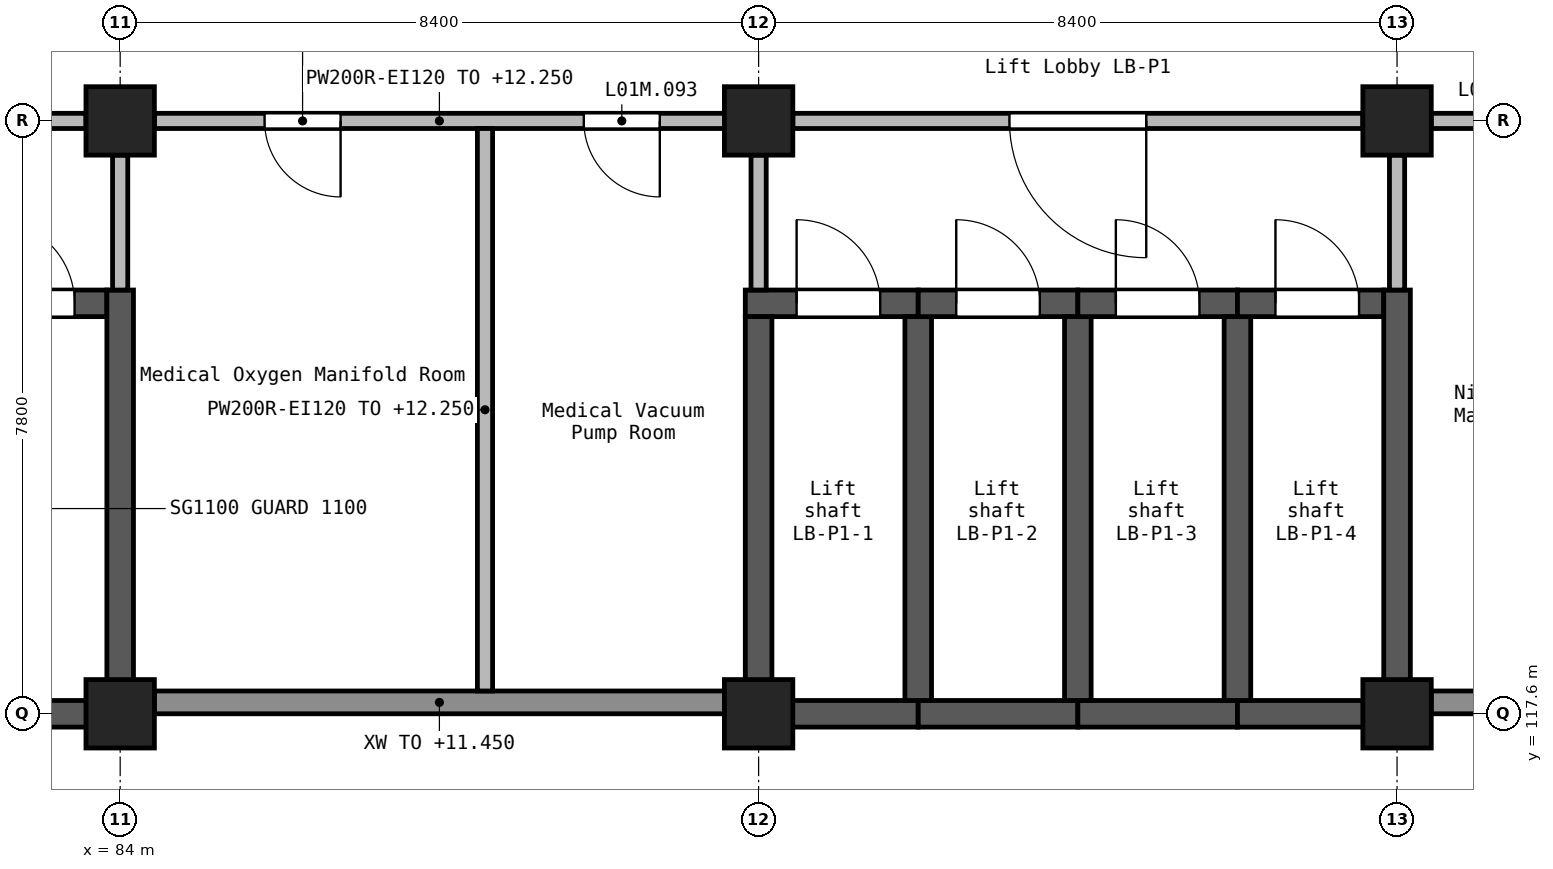
"""IFC4 building model, lengths in metres.
Left out: names, types, materials, properties, quantities, classifications, styles, units other than length and angle.
Written with IfcOpenShell. Run it as: python <this file> out.ifc"""

import sys

from ifc_helpers import new_model, si_unit, direction, frame, frame_2d, origin, origin_2d, place, context, subcontext, project, spatial, rectangle, extrude, element, fill, save


model = new_model("IFC4")
c1 = context("Model", 3, precision=1e-05, world=origin(), true_north=direction((0.0, 1.0)))
c2 = subcontext(c1, "Body", "Model", "MODEL_VIEW")
j1 = project(units=[si_unit("LENGTHUNIT", "METRE"), si_unit("PLANEANGLEUNIT", "RADIAN")], contexts=[c1])
p1 = place(None, origin())
s1 = spatial("IfcSite", under=j1, at=p1, CompositionType="ELEMENT")
p2 = place(p1, origin())
s2 = spatial("IfcBuilding", under=s1, at=p2, CompositionType="ELEMENT")
p3 = place(p2, frame((0.0, 0.0, 9.9)))
s3 = spatial("IfcBuildingStorey", under=s2, at=p3, CompositionType="ELEMENT", Elevation=9.9)
for number, where, z_axis, x_axis in (
    (1, (84.0, 117.6, 0.0), (0.0, 0.0, 1.0), (1.0, 0.0, 0.0)),
    (2, (84.0, 125.4, 0.0), (0.0, 0.0, 1.0), (1.0, 0.0, 0.0)),
    (3, (92.4, 117.6, 0.0), (0.0, 0.0, 1.0), (1.0, 0.0, 0.0)),
    (4, (92.4, 125.4, 0.0), (0.0, 0.0, 1.0), (1.0, 0.0, 0.0)),
    (5, (100.8, 117.6, 0.0), (0.0, 0.0, 1.0), (1.0, 0.0, 0.0)),
    (6, (100.8, 125.4, 0.0), (0.0, 0.0, 1.0), (1.0, 0.0, 0.0)),
):
    element("IfcColumn", number, at=place(p3, frame(where, z_axis=z_axis, x_axis=x_axis)), inside=s3, PredefinedType="COLUMN", context=c2, shape_type="SweptSolid", body=[
        extrude(rectangle(XDim=0.9, YDim=0.9, at=origin_2d()), origin(), (0.0, 0.0, 1.0), 2.7),
    ])
p4 = place(p3, frame((75.425, 123.0, 0.0), z_axis=(0.0, 0.0, 1.0), x_axis=(1.0, 0.0, 0.0)))
e7 = element("IfcWall", 7, at=p4, inside=s3, PredefinedType="SHEAR", context=c2, shape_type="SweptSolid", body=[
    extrude(rectangle(XDim=8.4, YDim=0.35, at=frame_2d((4.2, 0.0))), origin(), (0.0, 0.0, 1.0), 2.7),
])
p5 = place(p4, frame((6.875, 0.0, 0.0)))
e8 = element("IfcOpeningElement", 8, at=p5, cuts=e7, PredefinedType="OPENING", context=c2, shape_type="SweptSolid", body=[
    extrude(rectangle(XDim=1.1, YDim=2.1, at=frame_2d((0.55, 1.05))), frame((0.0, 0.185, 0.0), z_axis=(0.0, -1.0, 0.0), x_axis=(1.0, 0.0, 0.0)), (0.0, 0.0, 1.0), 0.37),
])
p6 = place(p3, frame((75.775, 117.6, 0.0), z_axis=(0.0, 0.0, 1.0), x_axis=(1.0, 0.0, 0.0)))
e9 = element("IfcWall", 9, at=p6, inside=s3, PredefinedType="SHEAR", context=c2, shape_type="SweptSolid", body=[
    extrude(rectangle(XDim=8.05, YDim=0.35, at=frame_2d((4.025, 0.0))), origin(), (0.0, 0.0, 1.0), 2.7),
])
p7 = place(p3, frame((84.0, 117.425, 0.0), z_axis=(0.0, 0.0, 1.0), x_axis=(0.0, 1.0, 0.0)))
e10 = element("IfcWall", 10, at=p7, inside=s3, PredefinedType="SHEAR", context=c2, shape_type="SweptSolid", body=[
    extrude(rectangle(XDim=5.75, YDim=0.35, at=frame_2d((2.875, 0.0))), origin(), (0.0, 0.0, 1.0), 2.7),
])
p8 = place(p3, frame((92.225, 123.0, 0.0), z_axis=(0.0, 0.0, 1.0), x_axis=(1.0, 0.0, 0.0)))
e11 = element("IfcWall", 11, at=p8, inside=s3, PredefinedType="SHEAR", context=c2, shape_type="SweptSolid", body=[
    extrude(rectangle(XDim=2.275, YDim=0.35, at=frame_2d((1.137, 0.0))), origin(), (0.0, 0.0, 1.0), 2.7),
])
p9 = place(p8, frame((0.675, 0.0, 0.0)))
e12 = element("IfcOpeningElement", 12, at=p9, cuts=e11, PredefinedType="OPENING", context=c2, shape_type="SweptSolid", body=[
    extrude(rectangle(XDim=1.1, YDim=2.1, at=frame_2d((0.55, 1.05))), frame((0.0, 0.185, 0.0), z_axis=(0.0, -1.0, 0.0), x_axis=(1.0, 0.0, 0.0)), (0.0, 0.0, 1.0), 0.37),
])
p10 = place(p3, frame((92.4, 117.425, 0.0), z_axis=(0.0, 0.0, 1.0), x_axis=(0.0, 1.0, 0.0)))
e13 = element("IfcWall", 13, at=p10, inside=s3, PredefinedType="SHEAR", context=c2, shape_type="SweptSolid", body=[
    extrude(rectangle(XDim=5.4, YDim=0.35, at=frame_2d((2.7, 0.0))), origin(), (0.0, 0.0, 1.0), 2.7),
])
p11 = place(p3, frame((92.575, 117.6, 0.0), z_axis=(0.0, 0.0, 1.0), x_axis=(1.0, 0.0, 0.0)))
e14 = element("IfcWall", 14, at=p11, inside=s3, PredefinedType="SHEAR", context=c2, shape_type="SweptSolid", body=[
    extrude(rectangle(XDim=1.925, YDim=0.35, at=frame_2d((0.962, 0.0))), origin(), (0.0, 0.0, 1.0), 2.7),
])
p12 = place(p3, frame((94.5, 117.6, 0.0), z_axis=(0.0, 0.0, 1.0), x_axis=(1.0, 0.0, 0.0)))
e15 = element("IfcWall", 15, at=p12, inside=s3, PredefinedType="SHEAR", context=c2, shape_type="SweptSolid", body=[
    extrude(rectangle(XDim=2.1, YDim=0.35, at=frame_2d((1.05, 0.0))), origin(), (0.0, 0.0, 1.0), 2.7),
])
p13 = place(p3, frame((94.5, 117.775, 0.0), z_axis=(0.0, 0.0, 1.0), x_axis=(0.0, 1.0, 0.0)))
e16 = element("IfcWall", 16, at=p13, inside=s3, PredefinedType="SHEAR", context=c2, shape_type="SweptSolid", body=[
    extrude(rectangle(XDim=5.05, YDim=0.35, at=frame_2d((2.525, 0.0))), origin(), (0.0, 0.0, 1.0), 2.7),
])
p14 = place(p3, frame((94.5, 123.0, 0.0), z_axis=(0.0, 0.0, 1.0), x_axis=(1.0, 0.0, 0.0)))
e17 = element("IfcWall", 17, at=p14, inside=s3, PredefinedType="SHEAR", context=c2, shape_type="SweptSolid", body=[
    extrude(rectangle(XDim=2.1, YDim=0.35, at=frame_2d((1.05, 0.0))), origin(), (0.0, 0.0, 1.0), 2.7),
])
p15 = place(p14, frame((0.5, 0.0, 0.0)))
e18 = element("IfcOpeningElement", 18, at=p15, cuts=e17, PredefinedType="OPENING", context=c2, shape_type="SweptSolid", body=[
    extrude(rectangle(XDim=1.1, YDim=2.1, at=frame_2d((0.55, 1.05))), frame((0.0, 0.185, 0.0), z_axis=(0.0, -1.0, 0.0), x_axis=(1.0, 0.0, 0.0)), (0.0, 0.0, 1.0), 0.37),
])
p16 = place(p3, frame((96.6, 117.6, 0.0), z_axis=(0.0, 0.0, 1.0), x_axis=(1.0, 0.0, 0.0)))
e19 = element("IfcWall", 19, at=p16, inside=s3, PredefinedType="SHEAR", context=c2, shape_type="SweptSolid", body=[
    extrude(rectangle(XDim=2.1, YDim=0.35, at=frame_2d((1.05, 0.0))), origin(), (0.0, 0.0, 1.0), 2.7),
])
p17 = place(p3, frame((96.6, 117.775, 0.0), z_axis=(0.0, 0.0, 1.0), x_axis=(0.0, 1.0, 0.0)))
e20 = element("IfcWall", 20, at=p17, inside=s3, PredefinedType="SHEAR", context=c2, shape_type="SweptSolid", body=[
    extrude(rectangle(XDim=5.05, YDim=0.35, at=frame_2d((2.525, 0.0))), origin(), (0.0, 0.0, 1.0), 2.7),
])
p18 = place(p3, frame((96.6, 123.0, 0.0), z_axis=(0.0, 0.0, 1.0), x_axis=(1.0, 0.0, 0.0)))
e21 = element("IfcWall", 21, at=p18, inside=s3, PredefinedType="SHEAR", context=c2, shape_type="SweptSolid", body=[
    extrude(rectangle(XDim=2.1, YDim=0.35, at=frame_2d((1.05, 0.0))), origin(), (0.0, 0.0, 1.0), 2.7),
])
p19 = place(p18, frame((0.5, 0.0, 0.0)))
e22 = element("IfcOpeningElement", 22, at=p19, cuts=e21, PredefinedType="OPENING", context=c2, shape_type="SweptSolid", body=[
    extrude(rectangle(XDim=1.1, YDim=2.1, at=frame_2d((0.55, 1.05))), frame((0.0, 0.185, 0.0), z_axis=(0.0, -1.0, 0.0), x_axis=(1.0, 0.0, 0.0)), (0.0, 0.0, 1.0), 0.37),
])
p20 = place(p3, frame((98.7, 117.6, 0.0), z_axis=(0.0, 0.0, 1.0), x_axis=(1.0, 0.0, 0.0)))
e23 = element("IfcWall", 23, at=p20, inside=s3, PredefinedType="SHEAR", context=c2, shape_type="SweptSolid", body=[
    extrude(rectangle(XDim=1.925, YDim=0.35, at=frame_2d((0.962, 0.0))), origin(), (0.0, 0.0, 1.0), 2.7),
])
p21 = place(p3, frame((98.7, 117.775, 0.0), z_axis=(0.0, 0.0, 1.0), x_axis=(0.0, 1.0, 0.0)))
e24 = element("IfcWall", 24, at=p21, inside=s3, PredefinedType="SHEAR", context=c2, shape_type="SweptSolid", body=[
    extrude(rectangle(XDim=5.05, YDim=0.35, at=frame_2d((2.525, 0.0))), origin(), (0.0, 0.0, 1.0), 2.7),
])
p22 = place(p3, frame((98.7, 123.0, 0.0), z_axis=(0.0, 0.0, 1.0), x_axis=(1.0, 0.0, 0.0)))
e25 = element("IfcWall", 25, at=p22, inside=s3, PredefinedType="SHEAR", context=c2, shape_type="SweptSolid", body=[
    extrude(rectangle(XDim=1.925, YDim=0.35, at=frame_2d((0.962, 0.0))), origin(), (0.0, 0.0, 1.0), 2.7),
])
p23 = place(p22, frame((0.5, 0.0, 0.0)))
e26 = element("IfcOpeningElement", 26, at=p23, cuts=e25, PredefinedType="OPENING", context=c2, shape_type="SweptSolid", body=[
    extrude(rectangle(XDim=1.1, YDim=2.1, at=frame_2d((0.55, 1.05))), frame((0.0, 0.185, 0.0), z_axis=(0.0, -1.0, 0.0), x_axis=(1.0, 0.0, 0.0)), (0.0, 0.0, 1.0), 0.37),
])
p24 = place(p3, frame((100.8, 117.425, 0.0), z_axis=(0.0, 0.0, 1.0), x_axis=(0.0, 1.0, 0.0)))
e27 = element("IfcWall", 27, at=p24, inside=s3, PredefinedType="SHEAR", context=c2, shape_type="SweptSolid", body=[
    extrude(rectangle(XDim=5.75, YDim=0.35, at=frame_2d((2.875, 0.0))), origin(), (0.0, 0.0, 1.0), 2.7),
])
for number, where, z_axis, x_axis in (
    (28, (84.45, 117.75, 0.0), (0.0, 0.0, 1.0), (1.0, 0.0, 0.0)),
    (29, (101.25, 117.75, 0.0), (0.0, 0.0, 1.0), (1.0, 0.0, 0.0)),
):
    element("IfcWall", number, at=place(p3, frame(where, z_axis=z_axis, x_axis=x_axis)), inside=s3, PredefinedType="STANDARD", context=c2, shape_type="SweptSolid", body=[
        extrude(rectangle(XDim=7.5, YDim=0.3, at=frame_2d((3.75, 0.0))), origin(), (0.0, 0.0, 1.0), 1.55),
    ])
p25 = place(p3, frame((108.75, 125.4, 0.0), z_axis=(0.0, 0.0, 1.0), x_axis=(-1.0, 0.0, 0.0)))
e30 = element("IfcWall", 30, at=p25, inside=s3, PredefinedType="SOLIDWALL", context=c2, shape_type="SweptSolid", body=[
    extrude(rectangle(XDim=7.5, YDim=0.2, at=frame_2d((3.75, 0.0))), origin(), (0.0, 0.0, 1.0), 2.35),
])
p26 = place(p25, frame((5.65, 0.0, 0.0)))
e31 = element("IfcOpeningElement", 31, at=p26, cuts=e30, PredefinedType="OPENING", context=c2, shape_type="SweptSolid", body=[
    extrude(rectangle(XDim=1.0, YDim=2.1, at=frame_2d((0.5, 1.05))), frame((0.0, 0.11, 0.0), z_axis=(0.0, -1.0, 0.0), x_axis=(1.0, 0.0, 0.0)), (0.0, 0.0, 1.0), 0.22),
])
p27 = place(p25, frame((1.45, 0.0, 0.0)))
e32 = element("IfcOpeningElement", 32, at=p27, cuts=e30, PredefinedType="OPENING", context=c2, shape_type="SweptSolid", body=[
    extrude(rectangle(XDim=1.0, YDim=2.1, at=frame_2d((0.5, 1.05))), frame((0.0, 0.11, 0.0), z_axis=(0.0, -1.0, 0.0), x_axis=(1.0, 0.0, 0.0)), (0.0, 0.0, 1.0), 0.22),
])
p28 = place(p3, frame((100.35, 125.4, 0.0), z_axis=(0.0, 0.0, 1.0), x_axis=(-1.0, 0.0, 0.0)))
e33 = element("IfcWall", 33, at=p28, inside=s3, PredefinedType="SOLIDWALL", context=c2, shape_type="SweptSolid", body=[
    extrude(rectangle(XDim=7.5, YDim=0.2, at=frame_2d((3.75, 0.0))), origin(), (0.0, 0.0, 1.0), 2.35),
])
p29 = place(p28, frame((2.85, 0.0, 0.0)))
e34 = element("IfcOpeningElement", 34, at=p29, cuts=e33, PredefinedType="OPENING", context=c2, shape_type="SweptSolid", body=[
    extrude(rectangle(XDim=1.8, YDim=2.1, at=frame_2d((0.9, 1.05))), frame((0.0, 0.11, 0.0), z_axis=(0.0, -1.0, 0.0), x_axis=(1.0, 0.0, 0.0)), (0.0, 0.0, 1.0), 0.22),
])
p30 = place(p3, frame((91.95, 125.4, 0.0), z_axis=(0.0, 0.0, 1.0), x_axis=(-1.0, 0.0, 0.0)))
e35 = element("IfcWall", 35, at=p30, inside=s3, PredefinedType="SOLIDWALL", context=c2, shape_type="SweptSolid", body=[
    extrude(rectangle(XDim=7.5, YDim=0.2, at=frame_2d((3.75, 0.0))), origin(), (0.0, 0.0, 1.0), 2.35),
])
p31 = place(p30, frame((5.05, 0.0, 0.0)))
e36 = element("IfcOpeningElement", 36, at=p31, cuts=e35, PredefinedType="OPENING", context=c2, shape_type="SweptSolid", body=[
    extrude(rectangle(XDim=1.0, YDim=2.1, at=frame_2d((0.5, 1.05))), frame((0.0, 0.11, 0.0), z_axis=(0.0, -1.0, 0.0), x_axis=(1.0, 0.0, 0.0)), (0.0, 0.0, 1.0), 0.22),
])
p32 = place(p30, frame((0.85, 0.0, 0.0)))
e37 = element("IfcOpeningElement", 37, at=p32, cuts=e35, PredefinedType="OPENING", context=c2, shape_type="SweptSolid", body=[
    extrude(rectangle(XDim=1.0, YDim=2.1, at=frame_2d((0.5, 1.05))), frame((0.0, 0.11, 0.0), z_axis=(0.0, -1.0, 0.0), x_axis=(1.0, 0.0, 0.0)), (0.0, 0.0, 1.0), 0.22),
])
p33 = place(p3, frame((83.55, 125.4, 0.0), z_axis=(0.0, 0.0, 1.0), x_axis=(-1.0, 0.0, 0.0)))
e38 = element("IfcWall", 38, at=p33, inside=s3, PredefinedType="SOLIDWALL", context=c2, shape_type="SweptSolid", body=[
    extrude(rectangle(XDim=7.5, YDim=0.2, at=frame_2d((3.75, 0.0))), origin(), (0.0, 0.0, 1.0), 2.35),
])
p34 = place(p33, frame((3.2, 0.0, 0.0)))
e39 = element("IfcOpeningElement", 39, at=p34, cuts=e38, PredefinedType="OPENING", context=c2, shape_type="SweptSolid", body=[
    extrude(rectangle(XDim=1.1, YDim=2.1, at=frame_2d((0.55, 1.05))), frame((0.0, 0.11, 0.0), z_axis=(0.0, -1.0, 0.0), x_axis=(1.0, 0.0, 0.0)), (0.0, 0.0, 1.0), 0.22),
])
for number, where, z_axis, x_axis in (
    (40, (84.0, 123.175, 0.0), (0.0, 0.0, 1.0), (0.0, 1.0, 0.0)),
    (41, (92.4, 123.175, 0.0), (0.0, 0.0, 1.0), (0.0, 1.0, 0.0)),
    (42, (100.8, 123.175, 0.0), (0.0, 0.0, 1.0), (0.0, 1.0, 0.0)),
):
    element("IfcWall", number, at=place(p3, frame(where, z_axis=z_axis, x_axis=x_axis)), inside=s3, PredefinedType="SOLIDWALL", context=c2, shape_type="SweptSolid", body=[
        extrude(rectangle(XDim=1.775, YDim=0.2, at=frame_2d((0.887, 0.0))), origin(), (0.0, 0.0, 1.0), 2.35),
    ])
p35 = place(p3, frame((88.8, 117.9, 0.0), z_axis=(0.0, 0.0, 1.0), x_axis=(0.0, 1.0, 0.0)))
e43 = element("IfcWall", 43, at=p35, inside=s3, PredefinedType="SOLIDWALL", context=c2, shape_type="SweptSolid", body=[
    extrude(rectangle(XDim=7.4, YDim=0.2, at=frame_2d((3.7, 0.0))), origin(), (0.0, 0.0, 1.0), 2.35),
])
p36 = place(p9, origin())
e44 = element("IfcDoor", 44, at=p36, inside=s3, OperationType="DOUBLE_DOOR_SLIDING", PredefinedType="DOOR", context=c2, shape_type="SweptSolid", body=[
    extrude(rectangle(XDim=1.1, YDim=2.1, at=frame_2d((0.55, 1.05))), frame((0.0, 0.025, 0.0), z_axis=(0.0, -1.0, 0.0), x_axis=(1.0, 0.0, 0.0)), (0.0, 0.0, 1.0), 0.05),
])
fill(e12, e44)
p37 = place(p15, origin())
e45 = element("IfcDoor", 45, at=p37, inside=s3, OperationType="DOUBLE_DOOR_SLIDING", PredefinedType="DOOR", context=c2, shape_type="SweptSolid", body=[
    extrude(rectangle(XDim=1.1, YDim=2.1, at=frame_2d((0.55, 1.05))), frame((0.0, 0.025, 0.0), z_axis=(0.0, -1.0, 0.0), x_axis=(1.0, 0.0, 0.0)), (0.0, 0.0, 1.0), 0.05),
])
fill(e18, e45)
p38 = place(p19, origin())
e46 = element("IfcDoor", 46, at=p38, inside=s3, OperationType="DOUBLE_DOOR_SLIDING", PredefinedType="DOOR", context=c2, shape_type="SweptSolid", body=[
    extrude(rectangle(XDim=1.1, YDim=2.1, at=frame_2d((0.55, 1.05))), frame((0.0, 0.025, 0.0), z_axis=(0.0, -1.0, 0.0), x_axis=(1.0, 0.0, 0.0)), (0.0, 0.0, 1.0), 0.05),
])
fill(e22, e46)
p39 = place(p23, origin())
e47 = element("IfcDoor", 47, at=p39, inside=s3, OperationType="DOUBLE_DOOR_SLIDING", PredefinedType="DOOR", context=c2, shape_type="SweptSolid", body=[
    extrude(rectangle(XDim=1.1, YDim=2.1, at=frame_2d((0.55, 1.05))), frame((0.0, 0.025, 0.0), z_axis=(0.0, -1.0, 0.0), x_axis=(1.0, 0.0, 0.0)), (0.0, 0.0, 1.0), 0.05),
])
fill(e26, e47)
p40 = place(p5, frame((1.1, 0.0, 0.0), z_axis=(0.0, 0.0, 1.0), x_axis=(-1.0, 0.0, 0.0)))
e48 = element("IfcDoor", 48, at=p40, inside=s3, OperationType="SINGLE_SWING_LEFT", PredefinedType="DOOR", context=c2, shape_type="SweptSolid", body=[
    extrude(rectangle(XDim=1.1, YDim=2.1, at=frame_2d((0.55, 1.05))), frame((0.0, 0.025, 0.0), z_axis=(0.0, -1.0, 0.0), x_axis=(1.0, 0.0, 0.0)), (0.0, 0.0, 1.0), 0.05),
])
fill(e8, e48)
p41 = place(p29, origin())
e49 = element("IfcDoor", 49, at=p41, inside=s3, OperationType="DOUBLE_DOOR_SINGLE_SWING", PredefinedType="DOOR", context=c2, shape_type="SweptSolid", body=[
    extrude(rectangle(XDim=1.8, YDim=2.1, at=frame_2d((0.9, 1.05))), frame((0.0, 0.025, 0.0), z_axis=(0.0, -1.0, 0.0), x_axis=(1.0, 0.0, 0.0)), (0.0, 0.0, 1.0), 0.05),
])
fill(e34, e49)
p42 = place(p31, origin())
e50 = element("IfcDoor", 50, at=p42, inside=s3, OperationType="SINGLE_SWING_RIGHT", PredefinedType="DOOR", context=c2, shape_type="SweptSolid", body=[
    extrude(rectangle(XDim=1.0, YDim=2.1, at=frame_2d((0.5, 1.05))), frame((0.0, 0.025, 0.0), z_axis=(0.0, -1.0, 0.0), x_axis=(1.0, 0.0, 0.0)), (0.0, 0.0, 1.0), 0.05),
])
fill(e36, e50)
p43 = place(p32, origin())
e51 = element("IfcDoor", 51, at=p43, inside=s3, OperationType="SINGLE_SWING_LEFT", PredefinedType="DOOR", context=c2, shape_type="SweptSolid", body=[
    extrude(rectangle(XDim=1.0, YDim=2.1, at=frame_2d((0.5, 1.05))), frame((0.0, 0.025, 0.0), z_axis=(0.0, -1.0, 0.0), x_axis=(1.0, 0.0, 0.0)), (0.0, 0.0, 1.0), 0.05),
])
fill(e37, e51)
save(model, sys.argv[1])
